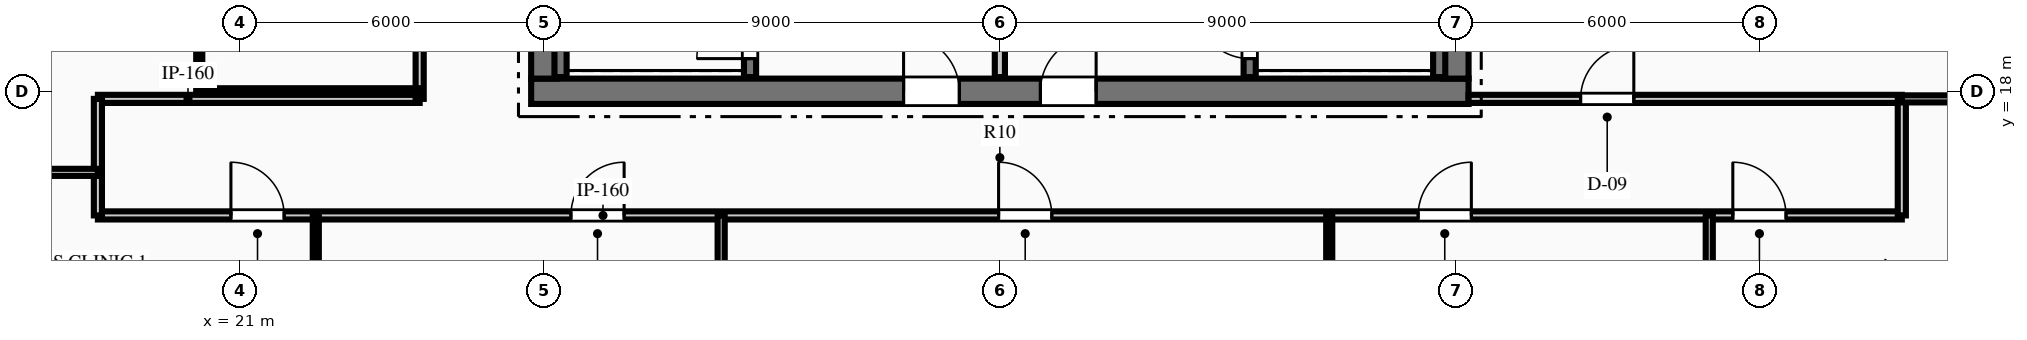
"""IFC4 building model, lengths in metres.
Left out: names, types, materials, properties, quantities, classifications, styles, units other than length and angle.
Written with IfcOpenShell. Run it as: python <this file> out.ifc"""

import sys

from ifc_helpers import new_model, si_unit, direction, frame, frame_2d, origin, place, context, subcontext, project, spatial, rectangle, extrude, element, fill, save


model = new_model("IFC4")
c1 = context("Model", 3, precision=1e-05, world=origin(), true_north=direction((0.0, 1.0)))
c2 = subcontext(c1, "Body", "Model", "MODEL_VIEW")
j1 = project(units=[si_unit("LENGTHUNIT", "METRE"), si_unit("PLANEANGLEUNIT", "RADIAN")], contexts=[c1])
p1 = place(None, origin())
s1 = spatial("IfcSite", under=j1, at=p1, CompositionType="ELEMENT")
p2 = place(p1, origin())
s2 = spatial("IfcBuilding", under=s1, at=p2, CompositionType="ELEMENT")
p3 = place(p2, frame((0.0, 0.0, 235.95)))
s3 = spatial("IfcBuildingStorey", under=s2, at=p3, CompositionType="ELEMENT", Elevation=235.95)
p4 = place(p3, frame((26.75, 18.0, 0.0), z_axis=(0.0, 0.0, 1.0), x_axis=(1.0, 0.0, 0.0)))
e1 = element("IfcWall", 1, at=p4, inside=s3, PredefinedType="SHEAR", context=c2, shape_type="SweptSolid", body=[
    extrude(rectangle(XDim=18.5, YDim=0.5, at=frame_2d((9.25, 0.0))), origin(), (0.0, 0.0, 1.0), 3.75),
])
p5 = place(p4, frame((7.35, 0.0, 0.0)))
e2 = element("IfcOpeningElement", 2, at=p5, cuts=e1, PredefinedType="OPENING", context=c2, shape_type="SweptSolid", body=[
    extrude(rectangle(XDim=1.1, YDim=2.15, at=frame_2d((0.55, 1.075))), frame((0.0, 0.26, 0.0), z_axis=(0.0, -1.0, 0.0), x_axis=(1.0, 0.0, 0.0)), (0.0, 0.0, 1.0), 0.52),
])
p6 = place(p4, frame((10.05, 0.0, 0.0)))
e3 = element("IfcOpeningElement", 3, at=p6, cuts=e1, PredefinedType="OPENING", context=c2, shape_type="SweptSolid", body=[
    extrude(rectangle(XDim=1.1, YDim=2.15, at=frame_2d((0.55, 1.075))), frame((0.0, 0.26, 0.0), z_axis=(0.0, -1.0, 0.0), x_axis=(1.0, 0.0, 0.0)), (0.0, 0.0, 1.0), 0.52),
])
p7 = place(p3, frame((27.0, 18.25, 0.0), z_axis=(0.0, 0.0, 1.0), x_axis=(0.0, 1.0, 0.0)))
e4 = element("IfcWall", 4, at=p7, inside=s3, PredefinedType="SHEAR", context=c2, shape_type="SweptSolid", body=[
    extrude(rectangle(XDim=15.5, YDim=0.5, at=frame_2d((7.75, 0.0))), origin(), (0.0, 0.0, 1.0), 3.75),
])
p8 = place(p7, frame((9.99, 0.0, 0.0)))
e5 = element("IfcOpeningElement", 5, at=p8, cuts=e4, PredefinedType="OPENING", context=c2, shape_type="SweptSolid", body=[
    extrude(rectangle(XDim=1.4, YDim=2.2, at=frame_2d((0.7, 1.1))), frame((0.0, 0.26, 0.0), z_axis=(0.0, -1.0, 0.0), x_axis=(1.0, 0.0, 0.0)), (0.0, 0.0, 1.0), 0.52),
])
p9 = place(p3, frame((45.0, 18.25, 0.0), z_axis=(0.0, 0.0, 1.0), x_axis=(0.0, 1.0, 0.0)))
e6 = element("IfcWall", 6, at=p9, inside=s3, PredefinedType="SHEAR", context=c2, shape_type="SweptSolid", body=[
    extrude(rectangle(XDim=15.5, YDim=0.5, at=frame_2d((7.75, 0.0))), origin(), (0.0, 0.0, 1.0), 3.75),
])
p10 = place(p9, frame((9.99, 0.0, 0.0)))
e7 = element("IfcOpeningElement", 7, at=p10, cuts=e6, PredefinedType="OPENING", context=c2, shape_type="SweptSolid", body=[
    extrude(rectangle(XDim=1.4, YDim=2.2, at=frame_2d((0.7, 1.1))), frame((0.0, 0.26, 0.0), z_axis=(0.0, -1.0, 0.0), x_axis=(1.0, 0.0, 0.0)), (0.0, 0.0, 1.0), 0.52),
])
p11 = place(p3, frame((31.07, 18.28, 0.0), z_axis=(0.0, 0.0, 1.0), x_axis=(0.0, 1.0, 0.0)))
e8 = element("IfcWall", 8, at=p11, inside=s3, PredefinedType="SHEAR", context=c2, shape_type="SweptSolid", body=[
    extrude(rectangle(XDim=8.26, YDim=0.24, at=frame_2d((4.13, 0.0))), origin(), (0.0, 0.0, 1.0), 3.75),
])
p12 = place(p11, frame((0.365, 0.0, 0.0)))
e9 = element("IfcOpeningElement", 9, at=p12, cuts=e8, PredefinedType="OPENING", context=c2, shape_type="SweptSolid", body=[
    extrude(rectangle(XDim=1.05, YDim=2.15, at=frame_2d((0.525, 1.075))), frame((0.0, 0.13, 0.0), z_axis=(0.0, -1.0, 0.0), x_axis=(1.0, 0.0, 0.0)), (0.0, 0.0, 1.0), 0.26),
])
p13 = place(p3, frame((27.33, 18.28, 0.0), z_axis=(0.0, 0.0, 1.0), x_axis=(0.0, 1.0, 0.0)))
e10 = element("IfcWall", 10, at=p13, inside=s3, PredefinedType="SHEAR", context=c2, shape_type="SweptSolid", body=[
    extrude(rectangle(XDim=8.26, YDim=0.24, at=frame_2d((4.13, 0.0))), origin(), (0.0, 0.0, 1.0), 3.75),
])
p14 = place(p3, frame((40.93, 18.28, 0.0), z_axis=(0.0, 0.0, 1.0), x_axis=(0.0, 1.0, 0.0)))
e11 = element("IfcWall", 11, at=p14, inside=s3, PredefinedType="SHEAR", context=c2, shape_type="SweptSolid", body=[
    extrude(rectangle(XDim=8.26, YDim=0.24, at=frame_2d((4.13, 0.0))), origin(), (0.0, 0.0, 1.0), 3.75),
])
p15 = place(p14, frame((0.365, 0.0, 0.0)))
e12 = element("IfcOpeningElement", 12, at=p15, cuts=e11, PredefinedType="OPENING", context=c2, shape_type="SweptSolid", body=[
    extrude(rectangle(XDim=1.05, YDim=2.15, at=frame_2d((0.525, 1.075))), frame((0.0, 0.13, 0.0), z_axis=(0.0, -1.0, 0.0), x_axis=(1.0, 0.0, 0.0)), (0.0, 0.0, 1.0), 0.26),
])
p16 = place(p3, frame((44.67, 18.28, 0.0), z_axis=(0.0, 0.0, 1.0), x_axis=(0.0, 1.0, 0.0)))
e13 = element("IfcWall", 13, at=p16, inside=s3, PredefinedType="SHEAR", context=c2, shape_type="SweptSolid", body=[
    extrude(rectangle(XDim=8.26, YDim=0.24, at=frame_2d((4.13, 0.0))), origin(), (0.0, 0.0, 1.0), 3.75),
])
p17 = place(p3, frame((36.0, 18.28, 0.0), z_axis=(0.0, 0.0, 1.0), x_axis=(0.0, 1.0, 0.0)))
e14 = element("IfcWall", 14, at=p17, inside=s3, PredefinedType="PARTITIONING", context=c2, shape_type="SweptSolid", body=[
    extrude(rectangle(XDim=3.77, YDim=0.2, at=frame_2d((1.885, 0.0))), origin(), (0.0, 0.0, 1.0), 3.4),
])
p18 = place(p3, frame((18.2, 15.55, 0.0), z_axis=(0.0, 0.0, 1.0), x_axis=(1.0, 0.0, 0.0)))
e15 = element("IfcWall", 15, at=p18, inside=s3, PredefinedType="PARTITIONING", context=c2, shape_type="SweptSolid", body=[
    extrude(rectangle(XDim=35.6, YDim=0.16, at=frame_2d((17.8, 0.0))), origin(), (0.0, 0.0, 1.0), 2.938),
])
p19 = place(p18, frame((2.625, 0.0, 0.0)))
e16 = element("IfcOpeningElement", 16, at=p19, cuts=e15, PredefinedType="OPENING", context=c2, shape_type="SweptSolid", body=[
    extrude(rectangle(XDim=1.05, YDim=2.15, at=frame_2d((0.525, 1.075))), frame((0.0, 0.09, 0.0), z_axis=(0.0, -1.0, 0.0), x_axis=(1.0, 0.0, 0.0)), (0.0, 0.0, 1.0), 0.18),
])
p20 = place(p18, frame((9.335, 0.0, 0.0)))
e17 = element("IfcOpeningElement", 17, at=p20, cuts=e15, PredefinedType="OPENING", context=c2, shape_type="SweptSolid", body=[
    extrude(rectangle(XDim=1.05, YDim=2.15, at=frame_2d((0.525, 1.075))), frame((0.0, 0.09, 0.0), z_axis=(0.0, -1.0, 0.0), x_axis=(1.0, 0.0, 0.0)), (0.0, 0.0, 1.0), 0.18),
])
p21 = place(p18, frame((17.775, 0.0, 0.0)))
e18 = element("IfcOpeningElement", 18, at=p21, cuts=e15, PredefinedType="OPENING", context=c2, shape_type="SweptSolid", body=[
    extrude(rectangle(XDim=1.05, YDim=2.15, at=frame_2d((0.525, 1.075))), frame((0.0, 0.09, 0.0), z_axis=(0.0, -1.0, 0.0), x_axis=(1.0, 0.0, 0.0)), (0.0, 0.0, 1.0), 0.18),
])
p22 = place(p18, frame((26.055, 0.0, 0.0)))
e19 = element("IfcOpeningElement", 19, at=p22, cuts=e15, PredefinedType="OPENING", context=c2, shape_type="SweptSolid", body=[
    extrude(rectangle(XDim=1.05, YDim=2.15, at=frame_2d((0.525, 1.075))), frame((0.0, 0.09, 0.0), z_axis=(0.0, -1.0, 0.0), x_axis=(1.0, 0.0, 0.0)), (0.0, 0.0, 1.0), 0.18),
])
p23 = place(p18, frame((32.265, 0.0, 0.0)))
e20 = element("IfcOpeningElement", 20, at=p23, cuts=e15, PredefinedType="OPENING", context=c2, shape_type="SweptSolid", body=[
    extrude(rectangle(XDim=1.05, YDim=2.15, at=frame_2d((0.525, 1.075))), frame((0.0, 0.09, 0.0), z_axis=(0.0, -1.0, 0.0), x_axis=(1.0, 0.0, 0.0)), (0.0, 0.0, 1.0), 0.18),
])
p24 = place(p3, frame((18.2, 17.85, 0.0), z_axis=(0.0, 0.0, 1.0), x_axis=(1.0, 0.0, 0.0)))
e21 = element("IfcWall", 21, at=p24, inside=s3, PredefinedType="PARTITIONING", context=c2, shape_type="SweptSolid", body=[
    extrude(rectangle(XDim=6.35, YDim=0.16, at=frame_2d((3.175, 0.0))), origin(), (0.0, 0.0, 1.0), 3.4),
])
p25 = place(p3, frame((45.25, 17.85, 0.0), z_axis=(0.0, 0.0, 1.0), x_axis=(1.0, 0.0, 0.0)))
e22 = element("IfcWall", 22, at=p25, inside=s3, PredefinedType="PARTITIONING", context=c2, shape_type="SweptSolid", body=[
    extrude(rectangle(XDim=8.55, YDim=0.16, at=frame_2d((4.275, 0.0))), origin(), (0.0, 0.0, 1.0), 3.4),
])
p26 = place(p25, frame((2.211, 0.0, 0.0)))
e23 = element("IfcOpeningElement", 23, at=p26, cuts=e22, PredefinedType="OPENING", context=c2, shape_type="SweptSolid", body=[
    extrude(rectangle(XDim=1.05, YDim=2.15, at=frame_2d((0.525, 1.075))), frame((0.0, 0.09, 0.0), z_axis=(0.0, -1.0, 0.0), x_axis=(1.0, 0.0, 0.0)), (0.0, 0.0, 1.0), 0.18),
])
p27 = place(p3, frame((24.55, 17.85, 0.0), z_axis=(0.0, 0.0, 1.0), x_axis=(0.0, 1.0, 0.0)))
e24 = element("IfcWall", 24, at=p27, inside=s3, PredefinedType="PARTITIONING", context=c2, shape_type="SweptSolid", body=[
    extrude(rectangle(XDim=16.3, YDim=0.16, at=frame_2d((8.15, 0.0))), origin(), (0.0, 0.0, 1.0), 3.4),
])
p28 = place(p27, frame((2.775, 0.0, 0.0)))
e25 = element("IfcOpeningElement", 25, at=p28, cuts=e24, PredefinedType="OPENING", context=c2, shape_type="SweptSolid", body=[
    extrude(rectangle(XDim=0.95, YDim=2.15, at=frame_2d((0.475, 1.075))), frame((0.0, 0.09, 0.0), z_axis=(0.0, -1.0, 0.0), x_axis=(1.0, 0.0, 0.0)), (0.0, 0.0, 1.0), 0.18),
])
p29 = place(p27, frame((8.729, 0.0, 0.0)))
e26 = element("IfcOpeningElement", 26, at=p29, cuts=e24, PredefinedType="OPENING", context=c2, shape_type="SweptSolid", body=[
    extrude(rectangle(XDim=1.05, YDim=2.15, at=frame_2d((0.525, 1.075))), frame((0.0, 0.09, 0.0), z_axis=(0.0, -1.0, 0.0), x_axis=(1.0, 0.0, 0.0)), (0.0, 0.0, 1.0), 0.18),
])
for number, where, z_axis, x_axis in (
    (27, (18.2, 15.55, 0.0), (0.0, 0.0, 1.0), (0.0, 1.0, 0.0)),
    (28, (53.8, 15.55, 0.0), (0.0, 0.0, 1.0), (0.0, 1.0, 0.0)),
):
    element("IfcWall", number, at=place(p3, frame(where, z_axis=z_axis, x_axis=x_axis)), inside=s3, PredefinedType="PARTITIONING", context=c2, shape_type="SweptSolid", body=[
        extrude(rectangle(XDim=2.3, YDim=0.16, at=frame_2d((1.15, 0.0))), origin(), (0.0, 0.0, 1.0), 3.4),
    ])
p30 = place(p3, frame((10.086, 16.4, 0.0), z_axis=(0.0, 0.0, 1.0), x_axis=(1.0, 0.0, 0.0)))
e29 = element("IfcWall", 29, at=p30, inside=s3, PredefinedType="PARTITIONING", context=c2, shape_type="SweptSolid", body=[
    extrude(rectangle(XDim=8.114, YDim=0.14, at=frame_2d((4.057, 0.0))), origin(), (0.0, 0.0, 1.0), 3.4),
])
p31 = place(p3, frame((53.8, 17.85, 0.0), z_axis=(0.0, 0.0, 1.0), x_axis=(1.0, 0.0, 0.0)))
e30 = element("IfcWall", 30, at=p31, inside=s3, PredefinedType="PARTITIONING", context=c2, shape_type="SweptSolid", body=[
    extrude(rectangle(XDim=4.232, YDim=0.14, at=frame_2d((2.116, 0.0))), origin(), (0.0, 0.0, 1.0), 3.4),
])
p32 = place(p3, frame((22.5, 6.093, 0.0), z_axis=(0.0, 0.0, 1.0), x_axis=(0.0, 1.0, 0.0)))
e31 = element("IfcWall", 31, at=p32, inside=s3, PredefinedType="PARTITIONING", context=c2, shape_type="SweptSolid", body=[
    extrude(rectangle(XDim=9.457, YDim=0.12, at=frame_2d((4.729, 0.0))), origin(), (0.0, 0.0, 1.0), 3.4),
])
p33 = place(p3, frame((30.5, 1.857, 0.0), z_axis=(0.0, 0.0, 1.0), x_axis=(0.0, 1.0, 0.0)))
e32 = element("IfcWall", 32, at=p33, inside=s3, PredefinedType="PARTITIONING", context=c2, shape_type="SweptSolid", body=[
    extrude(rectangle(XDim=13.693, YDim=0.14, at=frame_2d((6.846, 0.0))), origin(), (0.0, 0.0, 1.0), 3.4),
])
p34 = place(p3, frame((42.5, -3.151, 0.0), z_axis=(0.0, 0.0, 1.0), x_axis=(0.0, 1.0, 0.0)))
e33 = element("IfcWall", 33, at=p34, inside=s3, PredefinedType="PARTITIONING", context=c2, shape_type="SweptSolid", body=[
    extrude(rectangle(XDim=18.701, YDim=0.12, at=frame_2d((9.351, 0.0))), origin(), (0.0, 0.0, 1.0), 3.4),
])
p35 = place(p3, frame((50.0, 2.68, 0.0), z_axis=(0.0, 0.0, 1.0), x_axis=(0.0, 1.0, 0.0)))
e34 = element("IfcWall", 34, at=p35, inside=s3, PredefinedType="PARTITIONING", context=c2, shape_type="SweptSolid", body=[
    extrude(rectangle(XDim=12.87, YDim=0.14, at=frame_2d((6.435, 0.0))), origin(), (0.0, 0.0, 1.0), 3.4),
])
p36 = place(p3, frame((20.2, 18.0, 0.0), z_axis=(0.0, 0.0, 1.0), x_axis=(1.0, 0.0, 0.0)))
e35 = element("IfcWall", 35, at=p36, inside=s3, PredefinedType="PARTITIONING", context=c2, shape_type="SweptSolid", body=[
    extrude(rectangle(XDim=4.35, YDim=0.12, at=frame_2d((2.175, 0.0))), origin(), (0.0, 0.0, 1.0), 3.4),
])
p37 = place(p3, frame((20.2, 18.0, 0.0), z_axis=(0.0, 0.0, 1.0), x_axis=(0.0, 1.0, 0.0)))
e36 = element("IfcWall", 36, at=p37, inside=s3, PredefinedType="PARTITIONING", context=c2, shape_type="SweptSolid", body=[
    extrude(rectangle(XDim=6.2, YDim=0.12, at=frame_2d((3.1, 0.0))), origin(), (0.0, 0.0, 1.0), 3.4),
])
p38 = place(p37, frame((3.825, 0.0, 0.0)))
e37 = element("IfcOpeningElement", 37, at=p38, cuts=e36, PredefinedType="OPENING", context=c2, shape_type="SweptSolid", body=[
    extrude(rectangle(XDim=0.95, YDim=2.15, at=frame_2d((0.475, 1.075))), frame((0.0, 0.07, 0.0), z_axis=(0.0, -1.0, 0.0), x_axis=(1.0, 0.0, 0.0)), (0.0, 0.0, 1.0), 0.14),
])
p39 = place(p12, origin())
e38 = element("IfcDoor", 38, at=p39, inside=s3, OperationType="SINGLE_SWING_LEFT", PredefinedType="DOOR", context=c2, shape_type="SweptSolid", body=[
    extrude(rectangle(XDim=1.05, YDim=2.15, at=frame_2d((0.525, 1.075))), frame((0.0, 0.025, 0.0), z_axis=(0.0, -1.0, 0.0), x_axis=(1.0, 0.0, 0.0)), (0.0, 0.0, 1.0), 0.05),
])
fill(e9, e38)
p40 = place(p15, origin())
e39 = element("IfcDoor", 39, at=p40, inside=s3, OperationType="SINGLE_SWING_RIGHT", PredefinedType="DOOR", context=c2, shape_type="SweptSolid", body=[
    extrude(rectangle(XDim=1.05, YDim=2.15, at=frame_2d((0.525, 1.075))), frame((0.0, 0.025, 0.0), z_axis=(0.0, -1.0, 0.0), x_axis=(1.0, 0.0, 0.0)), (0.0, 0.0, 1.0), 0.05),
])
fill(e12, e39)
p41 = place(p5, origin())
e40 = element("IfcDoor", 40, at=p41, inside=s3, OperationType="SINGLE_SWING_LEFT", PredefinedType="DOOR", context=c2, shape_type="SweptSolid", body=[
    extrude(rectangle(XDim=1.1, YDim=2.15, at=frame_2d((0.55, 1.075))), frame((0.0, 0.025, 0.0), z_axis=(0.0, -1.0, 0.0), x_axis=(1.0, 0.0, 0.0)), (0.0, 0.0, 1.0), 0.05),
])
fill(e2, e40)
p42 = place(p6, origin())
e41 = element("IfcDoor", 41, at=p42, inside=s3, OperationType="SINGLE_SWING_RIGHT", PredefinedType="DOOR", context=c2, shape_type="SweptSolid", body=[
    extrude(rectangle(XDim=1.1, YDim=2.15, at=frame_2d((0.55, 1.075))), frame((0.0, 0.025, 0.0), z_axis=(0.0, -1.0, 0.0), x_axis=(1.0, 0.0, 0.0)), (0.0, 0.0, 1.0), 0.05),
])
fill(e3, e41)
p43 = place(p19, origin())
e42 = element("IfcDoor", 42, at=p43, inside=s3, OperationType="SINGLE_SWING_LEFT", PredefinedType="DOOR", context=c2, shape_type="SweptSolid", body=[
    extrude(rectangle(XDim=1.05, YDim=2.15, at=frame_2d((0.525, 1.075))), frame((0.0, 0.025, 0.0), z_axis=(0.0, -1.0, 0.0), x_axis=(1.0, 0.0, 0.0)), (0.0, 0.0, 1.0), 0.05),
])
fill(e16, e42)
p44 = place(p20, origin())
e43 = element("IfcDoor", 43, at=p44, inside=s3, OperationType="SINGLE_SWING_RIGHT", PredefinedType="DOOR", context=c2, shape_type="SweptSolid", body=[
    extrude(rectangle(XDim=1.05, YDim=2.15, at=frame_2d((0.525, 1.075))), frame((0.0, 0.025, 0.0), z_axis=(0.0, -1.0, 0.0), x_axis=(1.0, 0.0, 0.0)), (0.0, 0.0, 1.0), 0.05),
])
fill(e17, e43)
p45 = place(p21, origin())
e44 = element("IfcDoor", 44, at=p45, inside=s3, OperationType="SINGLE_SWING_LEFT", PredefinedType="DOOR", context=c2, shape_type="SweptSolid", body=[
    extrude(rectangle(XDim=1.05, YDim=2.15, at=frame_2d((0.525, 1.075))), frame((0.0, 0.025, 0.0), z_axis=(0.0, -1.0, 0.0), x_axis=(1.0, 0.0, 0.0)), (0.0, 0.0, 1.0), 0.05),
])
fill(e18, e44)
p46 = place(p22, origin())
e45 = element("IfcDoor", 45, at=p46, inside=s3, OperationType="SINGLE_SWING_RIGHT", PredefinedType="DOOR", context=c2, shape_type="SweptSolid", body=[
    extrude(rectangle(XDim=1.05, YDim=2.15, at=frame_2d((0.525, 1.075))), frame((0.0, 0.025, 0.0), z_axis=(0.0, -1.0, 0.0), x_axis=(1.0, 0.0, 0.0)), (0.0, 0.0, 1.0), 0.05),
])
fill(e19, e45)
p47 = place(p23, origin())
e46 = element("IfcDoor", 46, at=p47, inside=s3, OperationType="SINGLE_SWING_LEFT", PredefinedType="DOOR", context=c2, shape_type="SweptSolid", body=[
    extrude(rectangle(XDim=1.05, YDim=2.15, at=frame_2d((0.525, 1.075))), frame((0.0, 0.025, 0.0), z_axis=(0.0, -1.0, 0.0), x_axis=(1.0, 0.0, 0.0)), (0.0, 0.0, 1.0), 0.05),
])
fill(e20, e46)
p48 = place(p26, origin())
e47 = element("IfcDoor", 47, at=p48, inside=s3, OperationType="SINGLE_SWING_RIGHT", PredefinedType="DOOR", context=c2, shape_type="SweptSolid", body=[
    extrude(rectangle(XDim=1.05, YDim=2.15, at=frame_2d((0.525, 1.075))), frame((0.0, 0.025, 0.0), z_axis=(0.0, -1.0, 0.0), x_axis=(1.0, 0.0, 0.0)), (0.0, 0.0, 1.0), 0.05),
])
fill(e23, e47)
save(model, sys.argv[1])
